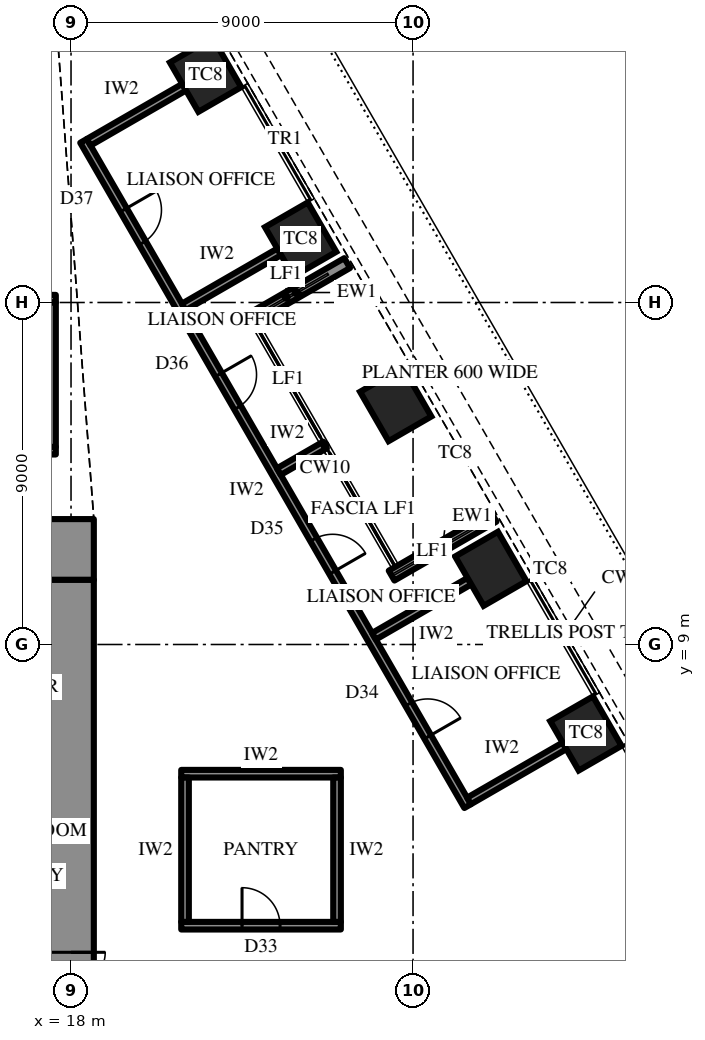
"""IFC4 building model, lengths in metres.
Left out: names, types, materials, properties, quantities, classifications, styles, units other than length and angle.
Written with IfcOpenShell. Run it as: python <this file> out.ifc"""

import sys

from ifc_helpers import new_model, si_unit, direction, frame, frame_2d, origin, origin_2d, place, context, subcontext, project, spatial, rectangle, extrude, element, fill, save


model = new_model("IFC4")
c1 = context("Model", 3, precision=1e-05, world=origin(), true_north=direction((0.0, 1.0)))
c2 = subcontext(c1, "Body", "Model", "MODEL_VIEW")
j1 = project(units=[si_unit("LENGTHUNIT", "METRE"), si_unit("PLANEANGLEUNIT", "RADIAN")], contexts=[c1])
p1 = place(None, origin())
s1 = spatial("IfcSite", under=j1, at=p1, CompositionType="ELEMENT")
p2 = place(p1, origin())
s2 = spatial("IfcBuilding", under=s1, at=p2, CompositionType="ELEMENT")
p3 = place(p2, frame((0.0, 0.0, 186.7)))
s3 = spatial("IfcBuildingStorey", under=s2, at=p3, CompositionType="ELEMENT", Elevation=186.7)
for number, where, z_axis, x_axis in (
    (1, (31.547, 6.658, 0.0), (0.0, 0.0, 1.0), (-0.5, 0.866, 0.0)),
    (2, (29.045, 10.992, 0.0), (0.0, 0.0, 1.0), (-0.5, 0.866, 0.0)),
    (3, (26.544, 15.325, 0.0), (0.0, 0.0, 1.0), (-0.5, 0.866, 0.0)),
    (4, (24.042, 19.658, 0.0), (0.0, 0.0, 1.0), (-0.5, 0.866, 0.0)),
    (5, (21.54, 23.992, 0.0), (0.0, 0.0, 1.0), (-0.5, 0.866, 0.0)),
):
    element("IfcColumn", number, at=place(p3, frame(where, z_axis=z_axis, x_axis=x_axis)), inside=s3, PredefinedType="COLUMN", context=c2, shape_type="SweptSolid", body=[
        extrude(rectangle(XDim=1.5, YDim=1.3, at=origin_2d()), origin(), (0.0, 0.0, 1.0), 4.2),
    ])
p4 = place(p3, frame((-18.6, 11.5, 0.0), z_axis=(0.0, 0.0, 1.0), x_axis=(1.0, 0.0, 0.0)))
e6 = element("IfcWall", 6, at=p4, inside=s3, PredefinedType="SHEAR", context=c2, shape_type="SweptSolid", body=[
    extrude(rectangle(XDim=37.2, YDim=1.6, at=frame_2d((18.6, 0.0))), origin(), (0.0, 0.0, 1.0), 4.2),
])
p5 = place(p4, frame((19.45, 0.0, 0.0)))
e7 = element("IfcOpeningElement", 7, at=p5, cuts=e6, PredefinedType="OPENING", context=c2, shape_type="SweptSolid", body=[
    extrude(rectangle(XDim=0.9, YDim=2.2, at=frame_2d((0.45, 1.1))), frame((0.0, 0.81, 0.0), z_axis=(0.0, -1.0, 0.0), x_axis=(1.0, 0.0, 0.0)), (0.0, 0.0, 1.0), 1.62),
])
p6 = place(p4, frame((22.45, 0.0, 0.0)))
e8 = element("IfcOpeningElement", 8, at=p6, cuts=e6, PredefinedType="OPENING", context=c2, shape_type="SweptSolid", body=[
    extrude(rectangle(XDim=0.9, YDim=2.2, at=frame_2d((0.45, 1.1))), frame((0.0, 0.81, 0.0), z_axis=(0.0, -1.0, 0.0), x_axis=(1.0, 0.0, 0.0)), (0.0, 0.0, 1.0), 1.62),
])
p7 = place(p4, frame((25.5, 0.0, 0.0)))
e9 = element("IfcOpeningElement", 9, at=p7, cuts=e6, PredefinedType="OPENING", context=c2, shape_type="SweptSolid", body=[
    extrude(rectangle(XDim=1.0, YDim=2.2, at=frame_2d((0.5, 1.1))), frame((0.0, 0.81, 0.0), z_axis=(0.0, -1.0, 0.0), x_axis=(1.0, 0.0, 0.0)), (0.0, 0.0, 1.0), 1.62),
])
p8 = place(p4, frame((1.8, 0.0, 0.0)))
e10 = element("IfcOpeningElement", 10, at=p8, cuts=e6, PredefinedType="OPENING", context=c2, shape_type="SweptSolid", body=[
    extrude(rectangle(XDim=0.9, YDim=2.2, at=frame_2d((0.45, 1.1))), frame((0.0, 0.81, 0.0), z_axis=(0.0, -1.0, 0.0), x_axis=(1.0, 0.0, 0.0)), (0.0, 0.0, 1.0), 1.62),
])
p9 = place(p4, frame((4.65, 0.0, 0.0)))
e11 = element("IfcOpeningElement", 11, at=p9, cuts=e6, PredefinedType="OPENING", context=c2, shape_type="SweptSolid", body=[
    extrude(rectangle(XDim=0.9, YDim=2.2, at=frame_2d((0.45, 1.1))), frame((0.0, 0.81, 0.0), z_axis=(0.0, -1.0, 0.0), x_axis=(1.0, 0.0, 0.0)), (0.0, 0.0, 1.0), 1.62),
])
p10 = place(p4, frame((7.75, 0.0, 0.0)))
e12 = element("IfcOpeningElement", 12, at=p10, cuts=e6, PredefinedType="OPENING", context=c2, shape_type="SweptSolid", body=[
    extrude(rectangle(XDim=0.9, YDim=2.2, at=frame_2d((0.45, 1.1))), frame((0.0, 0.81, 0.0), z_axis=(0.0, -1.0, 0.0), x_axis=(1.0, 0.0, 0.0)), (0.0, 0.0, 1.0), 1.62),
])
p11 = place(p4, frame((28.55, 0.0, 0.0)))
e13 = element("IfcOpeningElement", 13, at=p11, cuts=e6, PredefinedType="OPENING", context=c2, shape_type="SweptSolid", body=[
    extrude(rectangle(XDim=0.9, YDim=2.2, at=frame_2d((0.45, 1.1))), frame((0.0, 0.81, 0.0), z_axis=(0.0, -1.0, 0.0), x_axis=(1.0, 0.0, 0.0)), (0.0, 0.0, 1.0), 1.62),
])
p12 = place(p4, frame((31.65, 0.0, 0.0)))
e14 = element("IfcOpeningElement", 14, at=p12, cuts=e6, PredefinedType="OPENING", context=c2, shape_type="SweptSolid", body=[
    extrude(rectangle(XDim=0.9, YDim=2.2, at=frame_2d((0.45, 1.1))), frame((0.0, 0.81, 0.0), z_axis=(0.0, -1.0, 0.0), x_axis=(1.0, 0.0, 0.0)), (0.0, 0.0, 1.0), 1.62),
])
p13 = place(p4, frame((34.5, 0.0, 0.0)))
e15 = element("IfcOpeningElement", 15, at=p13, cuts=e6, PredefinedType="OPENING", context=c2, shape_type="SweptSolid", body=[
    extrude(rectangle(XDim=0.9, YDim=2.2, at=frame_2d((0.45, 1.1))), frame((0.0, 0.81, 0.0), z_axis=(0.0, -1.0, 0.0), x_axis=(1.0, 0.0, 0.0)), (0.0, 0.0, 1.0), 1.62),
])
p14 = place(p3, frame((18.0, -10.7, 0.0), z_axis=(0.0, 0.0, 1.0), x_axis=(0.0, 1.0, 0.0)))
e16 = element("IfcWall", 16, at=p14, inside=s3, PredefinedType="SHEAR", context=c2, shape_type="SweptSolid", body=[
    extrude(rectangle(XDim=21.4, YDim=1.2, at=frame_2d((10.7, 0.0))), origin(), (0.0, 0.0, 1.0), 4.2),
])
p15 = place(p14, frame((9.8, 0.0, 0.0)))
e17 = element("IfcOpeningElement", 17, at=p15, cuts=e16, PredefinedType="OPENING", context=c2, shape_type="SweptSolid", body=[
    extrude(rectangle(XDim=1.8, YDim=2.4, at=frame_2d((0.9, 1.2))), frame((0.0, 0.61, 0.0), z_axis=(0.0, -1.0, 0.0), x_axis=(1.0, 0.0, 0.0)), (0.0, 0.0, 1.0), 1.22),
])
p16 = place(p3, frame((29.12, 12.363, 0.0), z_axis=(0.0, 0.0, 1.0), x_axis=(-0.86602952684, -0.49999285859, 0.0)))
e18 = element("IfcWall", 18, at=p16, inside=s3, PredefinedType="SOLIDWALL", context=c2, shape_type="SweptSolid", body=[
    extrude(rectangle(XDim=3.1, YDim=0.3, at=frame_2d((1.55, 0.0))), origin(), (0.0, 0.0, 1.0), 2.75),
])
p17 = place(p3, frame((25.266, 19.037, 0.0), z_axis=(0.0, 0.0, 1.0), x_axis=(-0.86600983753, -0.500026960575, 0.0)))
e19 = element("IfcWall", 19, at=p17, inside=s3, PredefinedType="SOLIDWALL", context=c2, shape_type="SweptSolid", body=[
    extrude(rectangle(XDim=3.1, YDim=0.3, at=frame_2d((1.55, 0.0))), origin(), (0.0, 0.0, 1.0), 2.75),
])
p18 = place(p3, frame((-17.6, 14.1, 0.0), z_axis=(0.0, 0.0, 1.0), x_axis=(1.0, 0.0, 0.0)))
e20 = element("IfcWall", 20, at=p18, inside=s3, PredefinedType="PARTITIONING", context=c2, shape_type="SweptSolid", body=[
    extrude(rectangle(XDim=35.2, YDim=0.2, at=frame_2d((17.6, 0.0))), origin(), (0.0, 0.0, 1.0), 4.0),
])
p19 = place(p3, frame((-17.6, 18.1, 0.0), z_axis=(0.0, 0.0, 1.0), x_axis=(1.0, 0.0, 0.0)))
e21 = element("IfcWall", 21, at=p19, inside=s3, PredefinedType="PARTITIONING", context=c2, shape_type="SweptSolid", body=[
    extrude(rectangle(XDim=35.2, YDim=0.2, at=frame_2d((17.6, 0.0))), origin(), (0.0, 0.0, 1.0), 4.0),
])
p20 = place(p19, frame((7.95, 0.0, 0.0)))
e22 = element("IfcOpeningElement", 22, at=p20, cuts=e21, PredefinedType="OPENING", context=c2, shape_type="SweptSolid", body=[
    extrude(rectangle(XDim=1.8, YDim=2.4, at=frame_2d((0.9, 1.2))), frame((0.0, 0.11, 0.0), z_axis=(0.0, -1.0, 0.0), x_axis=(1.0, 0.0, 0.0)), (0.0, 0.0, 1.0), 0.22),
])
p21 = place(p19, frame((25.45, 0.0, 0.0)))
e23 = element("IfcOpeningElement", 23, at=p21, cuts=e21, PredefinedType="OPENING", context=c2, shape_type="SweptSolid", body=[
    extrude(rectangle(XDim=1.8, YDim=2.4, at=frame_2d((0.9, 1.2))), frame((0.0, 0.11, 0.0), z_axis=(0.0, -1.0, 0.0), x_axis=(1.0, 0.0, 0.0)), (0.0, 0.0, 1.0), 0.22),
])
p22 = place(p3, frame((17.5, 14.2, 0.0), z_axis=(0.0, 0.0, 1.0), x_axis=(0.0, 1.0, 0.0)))
e24 = element("IfcWall", 24, at=p22, inside=s3, PredefinedType="PARTITIONING", context=c2, shape_type="SweptSolid", body=[
    extrude(rectangle(XDim=3.8, YDim=0.2, at=frame_2d((1.9, 0.0))), origin(), (0.0, 0.0, 1.0), 4.0),
])
p23 = place(p3, frame((28.436, 4.747, 0.0), z_axis=(0.0, 0.0, 1.0), x_axis=(-0.499995666571, 0.866027905677, 0.0)))
e25 = element("IfcWall", 25, at=p23, inside=s3, PredefinedType="PARTITIONING", context=c2, shape_type="SweptSolid", body=[
    extrude(rectangle(XDim=20.215, YDim=0.2, at=frame_2d((10.107, 0.0))), origin(), (0.0, 0.0, 1.0), 4.0),
])
p24 = place(p23, frame((2.102, 0.0, 0.0)))
e26 = element("IfcOpeningElement", 26, at=p24, cuts=e25, PredefinedType="OPENING", context=c2, shape_type="SweptSolid", body=[
    extrude(rectangle(XDim=1.0, YDim=2.2, at=frame_2d((0.5, 1.1))), frame((0.0, 0.11, 0.0), z_axis=(0.0, -1.0, 0.0), x_axis=(1.0, 0.0, 0.0)), (0.0, 0.0, 1.0), 0.22),
])
p25 = place(p23, frame((7.105, 0.0, 0.0)))
e27 = element("IfcOpeningElement", 27, at=p25, cuts=e25, PredefinedType="OPENING", context=c2, shape_type="SweptSolid", body=[
    extrude(rectangle(XDim=1.0, YDim=2.2, at=frame_2d((0.5, 1.1))), frame((0.0, 0.11, 0.0), z_axis=(0.0, -1.0, 0.0), x_axis=(1.0, 0.0, 0.0)), (0.0, 0.0, 1.0), 0.22),
])
p26 = place(p23, frame((12.109, 0.0, 0.0)))
e28 = element("IfcOpeningElement", 28, at=p26, cuts=e25, PredefinedType="OPENING", context=c2, shape_type="SweptSolid", body=[
    extrude(rectangle(XDim=1.0, YDim=2.2, at=frame_2d((0.5, 1.1))), frame((0.0, 0.11, 0.0), z_axis=(0.0, -1.0, 0.0), x_axis=(1.0, 0.0, 0.0)), (0.0, 0.0, 1.0), 0.22),
])
p27 = place(p23, frame((17.113, 0.0, 0.0)))
e29 = element("IfcOpeningElement", 29, at=p27, cuts=e25, PredefinedType="OPENING", context=c2, shape_type="SweptSolid", body=[
    extrude(rectangle(XDim=1.0, YDim=2.2, at=frame_2d((0.5, 1.1))), frame((0.0, 0.11, 0.0), z_axis=(0.0, -1.0, 0.0), x_axis=(1.0, 0.0, 0.0)), (0.0, 0.0, 1.0), 0.22),
])
p28 = place(p3, frame((28.473, 4.883, 0.0), z_axis=(0.0, 0.0, 1.0), x_axis=(0.866032775405, 0.499987231761, 0.0)))
e30 = element("IfcWall", 30, at=p28, inside=s3, PredefinedType="PARTITIONING", context=c2, shape_type="SweptSolid", body=[
    extrude(rectangle(XDim=2.9, YDim=0.2, at=frame_2d((1.45, 0.0))), origin(), (0.0, 0.0, 1.0), 3.082),
])
p29 = place(p3, frame((25.971, 9.217, 0.0), z_axis=(0.0, 0.0, 1.0), x_axis=(0.865996321171, 0.50005036918, 0.0)))
e31 = element("IfcWall", 31, at=p29, inside=s3, PredefinedType="PARTITIONING", context=c2, shape_type="SweptSolid", body=[
    extrude(rectangle(XDim=2.9, YDim=0.2, at=frame_2d((1.45, 0.0))), origin(), (0.0, 0.0, 1.0), 3.082),
])
p30 = place(p3, frame((23.469, 13.55, 0.0), z_axis=(0.0, 0.0, 1.0), x_axis=(0.866057911062, 0.499943691516, 0.0)))
e32 = element("IfcWall", 32, at=p30, inside=s3, PredefinedType="PARTITIONING", context=c2, shape_type="SweptSolid", body=[
    extrude(rectangle(XDim=1.401, YDim=0.2, at=frame_2d((0.701, 0.0))), origin(), (0.0, 0.0, 1.0), 4.0),
])
p31 = place(p3, frame((20.968, 17.883, 0.0), z_axis=(0.0, 0.0, 1.0), x_axis=(0.866032775405, 0.499987231761, 0.0)))
e33 = element("IfcWall", 33, at=p31, inside=s3, PredefinedType="PARTITIONING", context=c2, shape_type="SweptSolid", body=[
    extrude(rectangle(XDim=2.9, YDim=0.2, at=frame_2d((1.45, 0.0))), origin(), (0.0, 0.0, 1.0), 3.082),
])
p32 = place(p3, frame((18.466, 22.217, 0.0), z_axis=(0.0, 0.0, 1.0), x_axis=(0.865996321171, 0.50005036918, 0.0)))
e34 = element("IfcWall", 34, at=p32, inside=s3, PredefinedType="PARTITIONING", context=c2, shape_type="SweptSolid", body=[
    extrude(rectangle(XDim=2.9, YDim=0.2, at=frame_2d((1.45, 0.0))), origin(), (0.0, 0.0, 1.0), 3.082),
])
p33 = place(p3, frame((20.9, 1.6, 0.0), z_axis=(0.0, 0.0, 1.0), x_axis=(1.0, 0.0, 0.0)))
e35 = element("IfcWall", 35, at=p33, inside=s3, PredefinedType="PARTITIONING", context=c2, shape_type="SweptSolid", body=[
    extrude(rectangle(XDim=4.2, YDim=0.2, at=frame_2d((2.1, 0.0))), origin(), (0.0, 0.0, 1.0), 4.0),
])
p34 = place(p33, frame((1.6, 0.0, 0.0)))
e36 = element("IfcOpeningElement", 36, at=p34, cuts=e35, PredefinedType="OPENING", context=c2, shape_type="SweptSolid", body=[
    extrude(rectangle(XDim=1.0, YDim=2.2, at=frame_2d((0.5, 1.1))), frame((0.0, 0.11, 0.0), z_axis=(0.0, -1.0, 0.0), x_axis=(1.0, 0.0, 0.0)), (0.0, 0.0, 1.0), 0.22),
])
p35 = place(p3, frame((20.9, 5.6, 0.0), z_axis=(0.0, 0.0, 1.0), x_axis=(1.0, 0.0, 0.0)))
e37 = element("IfcWall", 37, at=p35, inside=s3, PredefinedType="PARTITIONING", context=c2, shape_type="SweptSolid", body=[
    extrude(rectangle(XDim=4.2, YDim=0.2, at=frame_2d((2.1, 0.0))), origin(), (0.0, 0.0, 1.0), 4.0),
])
for number, where, z_axis, x_axis in (
    (38, (21.0, 1.7, 0.0), (0.0, 0.0, 1.0), (0.0, 1.0, 0.0)),
    (39, (25.0, 1.7, 0.0), (0.0, 0.0, 1.0), (0.0, 1.0, 0.0)),
):
    element("IfcWall", number, at=place(p3, frame(where, z_axis=z_axis, x_axis=x_axis)), inside=s3, PredefinedType="PARTITIONING", context=c2, shape_type="SweptSolid", body=[
        extrude(rectangle(XDim=3.8, YDim=0.2, at=frame_2d((1.9, 0.0))), origin(), (0.0, 0.0, 1.0), 4.0),
    ])
p36 = place(p15, frame((1.8, 0.0, 0.0), z_axis=(0.0, 0.0, 1.0), x_axis=(-1.0, 0.0, 0.0)))
e40 = element("IfcDoor", 40, at=p36, inside=s3, OperationType="DOUBLE_DOOR_SINGLE_SWING", PredefinedType="DOOR", context=c2, shape_type="SweptSolid", body=[
    extrude(rectangle(XDim=1.8, YDim=2.4, at=frame_2d((0.9, 1.2))), frame((0.0, 0.025, 0.0), z_axis=(0.0, -1.0, 0.0), x_axis=(1.0, 0.0, 0.0)), (0.0, 0.0, 1.0), 0.05),
])
fill(e17, e40)
p37 = place(p24, frame((1.0, 0.0, 0.0), z_axis=(0.0, 0.0, 1.0), x_axis=(-1.0, 0.0, 0.0)))
e41 = element("IfcDoor", 41, at=p37, inside=s3, OperationType="SINGLE_SWING_LEFT", PredefinedType="DOOR", context=c2, shape_type="SweptSolid", body=[
    extrude(rectangle(XDim=1.0, YDim=2.2, at=frame_2d((0.5, 1.1))), frame((0.0, 0.025, 0.0), z_axis=(0.0, -1.0, 0.0), x_axis=(1.0, 0.0, 0.0)), (0.0, 0.0, 1.0), 0.05),
])
fill(e26, e41)
p38 = place(p25, frame((1.0, 0.0, 0.0), z_axis=(0.0, 0.0, 1.0), x_axis=(-1.0, 0.0, 0.0)))
e42 = element("IfcDoor", 42, at=p38, inside=s3, OperationType="SINGLE_SWING_LEFT", PredefinedType="DOOR", context=c2, shape_type="SweptSolid", body=[
    extrude(rectangle(XDim=1.0, YDim=2.2, at=frame_2d((0.5, 1.1))), frame((0.0, 0.025, 0.0), z_axis=(0.0, -1.0, 0.0), x_axis=(1.0, 0.0, 0.0)), (0.0, 0.0, 1.0), 0.05),
])
fill(e27, e42)
p39 = place(p26, frame((1.0, 0.0, 0.0), z_axis=(0.0, 0.0, 1.0), x_axis=(-1.0, 0.0, 0.0)))
e43 = element("IfcDoor", 43, at=p39, inside=s3, OperationType="SINGLE_SWING_RIGHT", PredefinedType="DOOR", context=c2, shape_type="SweptSolid", body=[
    extrude(rectangle(XDim=1.0, YDim=2.2, at=frame_2d((0.5, 1.1))), frame((0.0, 0.025, 0.0), z_axis=(0.0, -1.0, 0.0), x_axis=(1.0, 0.0, 0.0)), (0.0, 0.0, 1.0), 0.05),
])
fill(e28, e43)
p40 = place(p27, frame((1.0, 0.0, 0.0), z_axis=(0.0, 0.0, 1.0), x_axis=(-1.0, 0.0, 0.0)))
e44 = element("IfcDoor", 44, at=p40, inside=s3, OperationType="SINGLE_SWING_RIGHT", PredefinedType="DOOR", context=c2, shape_type="SweptSolid", body=[
    extrude(rectangle(XDim=1.0, YDim=2.2, at=frame_2d((0.5, 1.1))), frame((0.0, 0.025, 0.0), z_axis=(0.0, -1.0, 0.0), x_axis=(1.0, 0.0, 0.0)), (0.0, 0.0, 1.0), 0.05),
])
fill(e29, e44)
p41 = place(p34, origin())
e45 = element("IfcDoor", 45, at=p41, inside=s3, OperationType="SINGLE_SWING_RIGHT", PredefinedType="DOOR", context=c2, shape_type="SweptSolid", body=[
    extrude(rectangle(XDim=1.0, YDim=2.2, at=frame_2d((0.5, 1.1))), frame((0.0, 0.025, 0.0), z_axis=(0.0, -1.0, 0.0), x_axis=(1.0, 0.0, 0.0)), (0.0, 0.0, 1.0), 0.05),
])
fill(e36, e45)
save(model, sys.argv[1])
